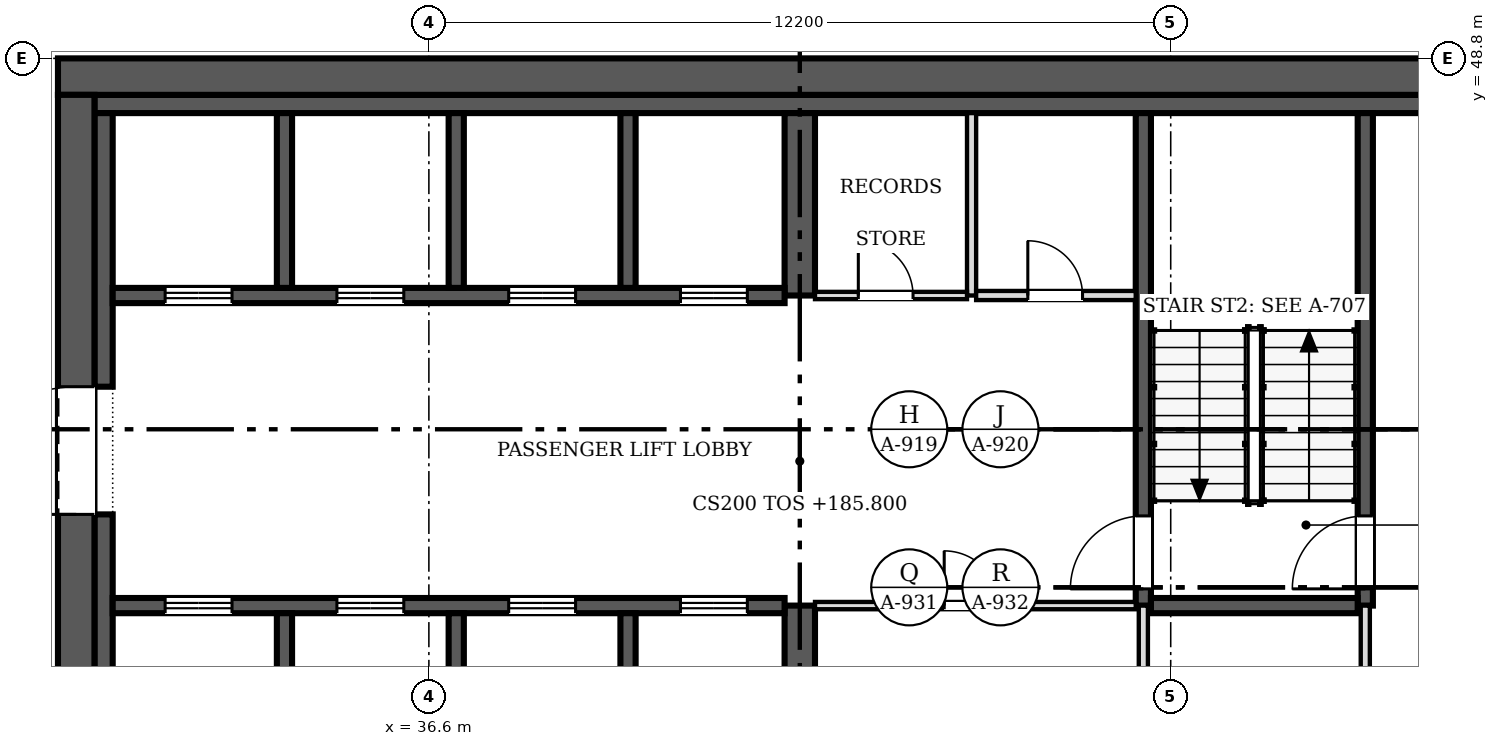
"""IFC4 building model, lengths in metres.
Left out: names, types, materials, properties, quantities, classifications, styles, units other than length and angle.
Written with IfcOpenShell. Run it as: python <this file> out.ifc"""

import sys

from ifc_helpers import new_model, si_unit, direction, frame, frame_2d, origin, place, context, subcontext, project, spatial, rectangle, extrude, source, transform, mapped, element, fill, save


model = new_model("IFC4")
c1 = context("Model", 3, precision=1e-05, world=origin(), true_north=direction((0.0, 1.0)))
c2 = subcontext(c1, "Body", "Model", "MODEL_VIEW")
j1 = project(units=[si_unit("LENGTHUNIT", "METRE"), si_unit("PLANEANGLEUNIT", "RADIAN")], contexts=[c1])
p1 = place(None, origin())
s1 = spatial("IfcSite", under=j1, at=p1, CompositionType="ELEMENT")
p2 = place(p1, origin())
s2 = spatial("IfcBuilding", under=s1, at=p2, CompositionType="ELEMENT")
p3 = place(p2, frame((0.0, 0.0, 185.8)))
s3 = spatial("IfcBuildingStorey", under=s2, at=p3, CompositionType="ELEMENT", Elevation=185.8)
p4 = place(p3, frame((30.8, 25.0, 0.0), z_axis=(0.0, 0.0, 1.0), x_axis=(0.0, 1.0, 0.0)))
e1 = element("IfcWall", 1, at=p4, inside=s3, PredefinedType="SHEAR", context=c2, shape_type="SweptSolid", body=[
    extrude(rectangle(XDim=23.2, YDim=0.6, at=frame_2d((11.6, 0.0))), origin(), (0.0, 0.0, 1.0), 3.8),
])
m1 = source(origin(), c2, "Body", "SweptSolid", [
    extrude(rectangle(XDim=2.1, YDim=2.4, at=frame_2d((1.05, 1.2))), frame((0.0, 0.31, 0.0), z_axis=(0.0, -1.0, 0.0), x_axis=(1.0, 0.0, 0.0)), (0.0, 0.0, 1.0), 0.62),
])
p5 = place(p4, frame((4.8, 0.0, 0.0)))
e2 = element("IfcOpeningElement", 2, at=p5, cuts=e1, PredefinedType="OPENING", context=c2, shape_type="MappedRepresentation", body=[
    mapped(m1, transform((0.0, 0.0, 0.0), scale=1.0)),
])
p6 = place(p4, frame((16.3, 0.0, 0.0)))
e3 = element("IfcOpeningElement", 3, at=p6, cuts=e1, PredefinedType="OPENING", context=c2, shape_type="MappedRepresentation", body=[
    mapped(m1, transform((0.0, 0.0, 0.0), scale=1.0)),
])
p7 = place(p3, frame((30.5, 48.5, 0.0), z_axis=(0.0, 0.0, 1.0), x_axis=(1.0, 0.0, 0.0)))
e4 = element("IfcWall", 4, at=p7, inside=s3, PredefinedType="SHEAR", context=c2, shape_type="SweptSolid", body=[
    extrude(rectangle(XDim=24.4, YDim=0.6, at=frame_2d((12.2, 0.0))), origin(), (0.0, 0.0, 1.0), 3.8),
])
p8 = place(p3, frame((31.1, 48.05, 0.0), z_axis=(0.0, 0.0, 1.0), x_axis=(1.0, 0.0, 0.0)))
e5 = element("IfcWall", 5, at=p8, inside=s3, PredefinedType="SOLIDWALL", context=c2, shape_type="SweptSolid", body=[
    extrude(rectangle(XDim=23.2, YDim=0.3, at=frame_2d((11.6, 0.0))), origin(), (0.0, 0.0, 1.0), 3.8),
])
p9 = place(p3, frame((31.25, 31.9, 0.0), z_axis=(0.0, 0.0, 1.0), x_axis=(0.0, 1.0, 0.0)))
e6 = element("IfcWall", 6, at=p9, inside=s3, PredefinedType="SOLIDWALL", context=c2, shape_type="SweptSolid", body=[
    extrude(rectangle(XDim=9.4, YDim=0.3, at=frame_2d((4.7, 0.0))), origin(), (0.0, 0.0, 1.0), 3.8),
])
p10 = place(p3, frame((31.25, 43.4, 0.0), z_axis=(0.0, 0.0, 1.0), x_axis=(0.0, 1.0, 0.0)))
e7 = element("IfcWall", 7, at=p10, inside=s3, PredefinedType="SOLIDWALL", context=c2, shape_type="SweptSolid", body=[
    extrude(rectangle(XDim=4.5, YDim=0.3, at=frame_2d((2.25, 0.0))), origin(), (0.0, 0.0, 1.0), 3.8),
])
p11 = place(p3, frame((42.7, 36.85, 0.0), z_axis=(0.0, 0.0, 1.0), x_axis=(0.0, 1.0, 0.0)))
e8 = element("IfcWall", 8, at=p11, inside=s3, PredefinedType="SHEAR", context=c2, shape_type="SweptSolid", body=[
    extrude(rectangle(XDim=2.95, YDim=0.5, at=frame_2d((1.475, 0.0))), origin(), (0.0, 0.0, 1.0), 3.8),
])
p12 = place(p3, frame((42.7, 44.9, 0.0), z_axis=(0.0, 0.0, 1.0), x_axis=(0.0, 1.0, 0.0)))
e9 = element("IfcWall", 9, at=p12, inside=s3, PredefinedType="SHEAR", context=c2, shape_type="SweptSolid", body=[
    extrude(rectangle(XDim=3.0, YDim=0.5, at=frame_2d((1.5, 0.0))), origin(), (0.0, 0.0, 1.0), 3.8),
])
p13 = place(p3, frame((31.4, 39.8, 0.0), z_axis=(0.0, 0.0, 1.0), x_axis=(1.0, 0.0, 0.0)))
e10 = element("IfcWall", 10, at=p13, inside=s3, PredefinedType="SOLIDWALL", context=c2, shape_type="SweptSolid", body=[
    extrude(rectangle(XDim=11.05, YDim=0.25, at=frame_2d((5.525, 0.0))), origin(), (0.0, 0.0, 1.0), 3.8),
])
m2 = source(origin(), c2, "Body", "SweptSolid", [
    extrude(rectangle(XDim=1.1, YDim=2.1, at=frame_2d((0.55, 1.05))), frame((0.0, 0.135, 0.0), z_axis=(0.0, -1.0, 0.0), x_axis=(1.0, 0.0, 0.0)), (0.0, 0.0, 1.0), 0.27),
])
p14 = place(p13, frame((0.863, 0.0, 0.0)))
e11 = element("IfcOpeningElement", 11, at=p14, cuts=e10, PredefinedType="OPENING", context=c2, shape_type="MappedRepresentation", body=[
    mapped(m2, transform((0.0, 0.0, 0.0), scale=1.0)),
])
p15 = place(p13, frame((3.688, 0.0, 0.0)))
e12 = element("IfcOpeningElement", 12, at=p15, cuts=e10, PredefinedType="OPENING", context=c2, shape_type="MappedRepresentation", body=[
    mapped(m2, transform((0.0, 0.0, 0.0), scale=1.0)),
])
p16 = place(p13, frame((6.512, 0.0, 0.0)))
e13 = element("IfcOpeningElement", 13, at=p16, cuts=e10, PredefinedType="OPENING", context=c2, shape_type="MappedRepresentation", body=[
    mapped(m2, transform((0.0, 0.0, 0.0), scale=1.0)),
])
p17 = place(p13, frame((9.337, 0.0, 0.0)))
e14 = element("IfcOpeningElement", 14, at=p17, cuts=e10, PredefinedType="OPENING", context=c2, shape_type="MappedRepresentation", body=[
    mapped(m2, transform((0.0, 0.0, 0.0), scale=1.0)),
])
p18 = place(p3, frame((42.45, 44.9, 0.0), z_axis=(0.0, 0.0, 1.0), x_axis=(-1.0, 0.0, 0.0)))
e15 = element("IfcWall", 15, at=p18, inside=s3, PredefinedType="SOLIDWALL", context=c2, shape_type="SweptSolid", body=[
    extrude(rectangle(XDim=11.05, YDim=0.25, at=frame_2d((5.525, 0.0))), origin(), (0.0, 0.0, 1.0), 3.8),
])
p19 = place(p18, frame((9.087, 0.0, 0.0)))
e16 = element("IfcOpeningElement", 16, at=p19, cuts=e15, PredefinedType="OPENING", context=c2, shape_type="MappedRepresentation", body=[
    mapped(m2, transform((0.0, 0.0, 0.0), scale=1.0)),
])
p20 = place(p18, frame((6.262, 0.0, 0.0)))
e17 = element("IfcOpeningElement", 17, at=p20, cuts=e15, PredefinedType="OPENING", context=c2, shape_type="MappedRepresentation", body=[
    mapped(m2, transform((0.0, 0.0, 0.0), scale=1.0)),
])
p21 = place(p18, frame((3.438, 0.0, 0.0)))
e18 = element("IfcOpeningElement", 18, at=p21, cuts=e15, PredefinedType="OPENING", context=c2, shape_type="MappedRepresentation", body=[
    mapped(m2, transform((0.0, 0.0, 0.0), scale=1.0)),
])
p22 = place(p18, frame((0.613, 0.0, 0.0)))
e19 = element("IfcOpeningElement", 19, at=p22, cuts=e15, PredefinedType="OPENING", context=c2, shape_type="MappedRepresentation", body=[
    mapped(m2, transform((0.0, 0.0, 0.0), scale=1.0)),
])
p23 = place(p3, frame((48.35, 47.9, 0.0), z_axis=(0.0, 0.0, 1.0), x_axis=(0.0, -1.0, 0.0)))
e20 = element("IfcWall", 20, at=p23, inside=s3, PredefinedType="SOLIDWALL", context=c2, shape_type="SweptSolid", body=[
    extrude(rectangle(XDim=8.1, YDim=0.25, at=frame_2d((4.05, 0.0))), origin(), (0.0, 0.0, 1.0), 3.8),
])
m3 = source(origin(), c2, "Body", "SweptSolid", [
    extrude(rectangle(XDim=1.2, YDim=2.1, at=frame_2d((0.6, 1.05))), frame((0.0, 0.135, 0.0), z_axis=(0.0, -1.0, 0.0), x_axis=(1.0, 0.0, 0.0)), (0.0, 0.0, 1.0), 0.27),
])
p24 = place(p23, frame((6.625, 0.0, 0.0)))
e21 = element("IfcOpeningElement", 21, at=p24, cuts=e20, PredefinedType="OPENING", context=c2, shape_type="MappedRepresentation", body=[
    mapped(m3, transform((0.0, 0.0, 0.0), scale=1.0)),
])
p25 = place(p3, frame((52.0, 39.8, 0.0), z_axis=(0.0, 0.0, 1.0), x_axis=(0.0, 1.0, 0.0)))
e22 = element("IfcWall", 22, at=p25, inside=s3, PredefinedType="SOLIDWALL", context=c2, shape_type="SweptSolid", body=[
    extrude(rectangle(XDim=8.1, YDim=0.25, at=frame_2d((4.05, 0.0))), origin(), (0.0, 0.0, 1.0), 3.8),
])
p26 = place(p25, frame((0.275, 0.0, 0.0)))
e23 = element("IfcOpeningElement", 23, at=p26, cuts=e22, PredefinedType="OPENING", context=c2, shape_type="MappedRepresentation", body=[
    mapped(m3, transform((0.0, 0.0, 0.0), scale=1.0)),
])
p27 = place(p3, frame((48.475, 39.8, 0.0), z_axis=(0.0, 0.0, 1.0), x_axis=(1.0, 0.0, 0.0)))
e24 = element("IfcWall", 24, at=p27, inside=s3, PredefinedType="SOLIDWALL", context=c2, shape_type="SweptSolid", body=[
    extrude(rectangle(XDim=3.4, YDim=0.25, at=frame_2d((1.7, 0.0))), origin(), (0.0, 0.0, 1.0), 3.8),
])
for number, where, z_axis, x_axis in (
    (25, (34.225, 36.85, 0.0), (0.0, 0.0, 1.0), (0.0, 1.0, 0.0)),
    (26, (37.05, 36.85, 0.0), (0.0, 0.0, 1.0), (0.0, 1.0, 0.0)),
    (27, (39.875, 36.85, 0.0), (0.0, 0.0, 1.0), (0.0, 1.0, 0.0)),
):
    element("IfcWall", number, at=place(p3, frame(where, z_axis=z_axis, x_axis=x_axis)), inside=s3, PredefinedType="SOLIDWALL", context=c2, shape_type="SweptSolid", body=[
        extrude(rectangle(XDim=2.825, YDim=0.25, at=frame_2d((1.413, 0.0))), origin(), (0.0, 0.0, 1.0), 3.8),
    ])
for number, where, z_axis, x_axis in (
    (28, (34.225, 45.025, 0.0), (0.0, 0.0, 1.0), (0.0, 1.0, 0.0)),
    (29, (37.05, 45.025, 0.0), (0.0, 0.0, 1.0), (0.0, 1.0, 0.0)),
    (30, (39.875, 45.025, 0.0), (0.0, 0.0, 1.0), (0.0, 1.0, 0.0)),
):
    element("IfcWall", number, at=place(p3, frame(where, z_axis=z_axis, x_axis=x_axis)), inside=s3, PredefinedType="SOLIDWALL", context=c2, shape_type="SweptSolid", body=[
        extrude(rectangle(XDim=2.875, YDim=0.25, at=frame_2d((1.438, 0.0))), origin(), (0.0, 0.0, 1.0), 3.8),
    ])
p28 = place(p3, frame((52.0, 33.525, 0.0), z_axis=(0.0, 0.0, 1.0), x_axis=(0.0, 1.0, 0.0)))
e31 = element("IfcWall", 31, at=p28, inside=s3, PredefinedType="PARTITIONING", context=c2, shape_type="SweptSolid", body=[
    extrude(rectangle(XDim=6.275, YDim=0.15, at=frame_2d((3.138, 0.0))), origin(), (0.0, 0.0, 1.0), 3.6),
])
m4 = source(origin(), c2, "Body", "SweptSolid", [
    extrude(rectangle(XDim=0.9, YDim=2.1, at=frame_2d((0.45, 1.05))), frame((0.0, 0.085, 0.0), z_axis=(0.0, -1.0, 0.0), x_axis=(1.0, 0.0, 0.0)), (0.0, 0.0, 1.0), 0.17),
])
p29 = place(p28, frame((1.025, 0.0, 0.0)))
e32 = element("IfcOpeningElement", 32, at=p29, cuts=e31, PredefinedType="OPENING", context=c2, shape_type="MappedRepresentation", body=[
    mapped(m4, transform((0.0, 0.0, 0.0), scale=1.0)),
])
p30 = place(p3, frame((48.225, 39.8, 0.0), z_axis=(0.0, 0.0, 1.0), x_axis=(-1.0, 0.0, 0.0)))
e33 = element("IfcWall", 33, at=p30, inside=s3, PredefinedType="PARTITIONING", context=c2, shape_type="SweptSolid", body=[
    extrude(rectangle(XDim=5.275, YDim=0.12, at=frame_2d((2.638, 0.0))), origin(), (0.0, 0.0, 1.0), 3.6),
])
m5 = source(origin(), c2, "Body", "SweptSolid", [
    extrude(rectangle(XDim=0.9, YDim=2.1, at=frame_2d((0.45, 1.05))), frame((0.0, 0.07, 0.0), z_axis=(0.0, -1.0, 0.0), x_axis=(1.0, 0.0, 0.0)), (0.0, 0.0, 1.0), 0.14),
])
p31 = place(p30, frame((2.25, 0.0, 0.0)))
e34 = element("IfcOpeningElement", 34, at=p31, cuts=e33, PredefinedType="OPENING", context=c2, shape_type="MappedRepresentation", body=[
    mapped(m5, transform((0.0, 0.0, 0.0), scale=1.0)),
])
p32 = place(p3, frame((48.35, 36.85, 0.0), z_axis=(0.0, 0.0, 1.0), x_axis=(0.0, 1.0, 0.0)))
e35 = element("IfcWall", 35, at=p32, inside=s3, PredefinedType="PARTITIONING", context=c2, shape_type="SweptSolid", body=[
    extrude(rectangle(XDim=2.95, YDim=0.15, at=frame_2d((1.475, 0.0))), origin(), (0.0, 0.0, 1.0), 3.6),
])
p33 = place(p3, frame((45.525, 44.9, 0.0), z_axis=(0.0, 0.0, 1.0), x_axis=(0.0, 1.0, 0.0)))
e36 = element("IfcWall", 36, at=p33, inside=s3, PredefinedType="PARTITIONING", context=c2, shape_type="SweptSolid", body=[
    extrude(rectangle(XDim=3.0, YDim=0.15, at=frame_2d((1.5, 0.0))), origin(), (0.0, 0.0, 1.0), 3.6),
])
p34 = place(p3, frame((42.95, 44.9, 0.0), z_axis=(0.0, 0.0, 1.0), x_axis=(1.0, 0.0, 0.0)))
e37 = element("IfcWall", 37, at=p34, inside=s3, PredefinedType="PARTITIONING", context=c2, shape_type="SweptSolid", body=[
    extrude(rectangle(XDim=2.5, YDim=0.12, at=frame_2d((1.25, 0.0))), origin(), (0.0, 0.0, 1.0), 3.6),
])
p35 = place(p34, frame((0.712, 0.0, 0.0)))
e38 = element("IfcOpeningElement", 38, at=p35, cuts=e37, PredefinedType="OPENING", context=c2, shape_type="MappedRepresentation", body=[
    mapped(m5, transform((0.0, 0.0, 0.0), scale=1.0)),
])
p36 = place(p3, frame((45.6, 44.9, 0.0), z_axis=(0.0, 0.0, 1.0), x_axis=(1.0, 0.0, 0.0)))
e39 = element("IfcWall", 39, at=p36, inside=s3, PredefinedType="PARTITIONING", context=c2, shape_type="SweptSolid", body=[
    extrude(rectangle(XDim=2.625, YDim=0.15, at=frame_2d((1.312, 0.0))), origin(), (0.0, 0.0, 1.0), 3.6),
])
p37 = place(p36, frame((0.85, 0.0, 0.0)))
e40 = element("IfcOpeningElement", 40, at=p37, cuts=e39, PredefinedType="OPENING", context=c2, shape_type="MappedRepresentation", body=[
    mapped(m4, transform((0.0, 0.0, 0.0), scale=1.0)),
])
m6 = source(origin(), c2, "Body", "SweptSolid", [
    extrude(rectangle(XDim=2.1, YDim=2.4, at=frame_2d((1.05, 1.2))), frame((0.0, 0.025, 0.0), z_axis=(0.0, -1.0, 0.0), x_axis=(1.0, 0.0, 0.0)), (0.0, 0.0, 1.0), 0.05),
])
p38 = place(p6, origin())
e41 = element("IfcDoor", 41, at=p38, inside=s3, OperationType="DOUBLE_DOOR_SINGLE_SWING", PredefinedType="DOOR", context=c2, shape_type="MappedRepresentation", body=[
    mapped(m6, transform((0.0, 0.0, 0.0), scale=1.0)),
])
fill(e3, e41)
m7 = source(origin(), c2, "Body", "SweptSolid", [
    extrude(rectangle(XDim=1.1, YDim=2.1, at=frame_2d((0.55, 1.05))), frame((0.0, 0.025, 0.0), z_axis=(0.0, -1.0, 0.0), x_axis=(1.0, 0.0, 0.0)), (0.0, 0.0, 1.0), 0.05),
])
p39 = place(p14, origin())
e42 = element("IfcDoor", 42, at=p39, inside=s3, OperationType="DOUBLE_DOOR_SLIDING", PredefinedType="DOOR", context=c2, shape_type="MappedRepresentation", body=[
    mapped(m7, transform((0.0, 0.0, 0.0), scale=1.0)),
])
fill(e11, e42)
p40 = place(p15, origin())
e43 = element("IfcDoor", 43, at=p40, inside=s3, OperationType="DOUBLE_DOOR_SLIDING", PredefinedType="DOOR", context=c2, shape_type="MappedRepresentation", body=[
    mapped(m7, transform((0.0, 0.0, 0.0), scale=1.0)),
])
fill(e12, e43)
p41 = place(p16, origin())
e44 = element("IfcDoor", 44, at=p41, inside=s3, OperationType="DOUBLE_DOOR_SLIDING", PredefinedType="DOOR", context=c2, shape_type="MappedRepresentation", body=[
    mapped(m7, transform((0.0, 0.0, 0.0), scale=1.0)),
])
fill(e13, e44)
p42 = place(p17, origin())
e45 = element("IfcDoor", 45, at=p42, inside=s3, OperationType="DOUBLE_DOOR_SLIDING", PredefinedType="DOOR", context=c2, shape_type="MappedRepresentation", body=[
    mapped(m7, transform((0.0, 0.0, 0.0), scale=1.0)),
])
fill(e14, e45)
p43 = place(p19, origin())
e46 = element("IfcDoor", 46, at=p43, inside=s3, OperationType="DOUBLE_DOOR_SLIDING", PredefinedType="DOOR", context=c2, shape_type="MappedRepresentation", body=[
    mapped(m7, transform((0.0, 0.0, 0.0), scale=1.0)),
])
fill(e16, e46)
p44 = place(p20, origin())
e47 = element("IfcDoor", 47, at=p44, inside=s3, OperationType="DOUBLE_DOOR_SLIDING", PredefinedType="DOOR", context=c2, shape_type="MappedRepresentation", body=[
    mapped(m7, transform((0.0, 0.0, 0.0), scale=1.0)),
])
fill(e17, e47)
p45 = place(p21, origin())
e48 = element("IfcDoor", 48, at=p45, inside=s3, OperationType="DOUBLE_DOOR_SLIDING", PredefinedType="DOOR", context=c2, shape_type="MappedRepresentation", body=[
    mapped(m7, transform((0.0, 0.0, 0.0), scale=1.0)),
])
fill(e18, e48)
p46 = place(p22, origin())
e49 = element("IfcDoor", 49, at=p46, inside=s3, OperationType="DOUBLE_DOOR_SLIDING", PredefinedType="DOOR", context=c2, shape_type="MappedRepresentation", body=[
    mapped(m7, transform((0.0, 0.0, 0.0), scale=1.0)),
])
fill(e19, e49)
m8 = source(origin(), c2, "Body", "SweptSolid", [
    extrude(rectangle(XDim=1.2, YDim=2.1, at=frame_2d((0.6, 1.05))), frame((0.0, 0.025, 0.0), z_axis=(0.0, -1.0, 0.0), x_axis=(1.0, 0.0, 0.0)), (0.0, 0.0, 1.0), 0.05),
])
p47 = place(p24, origin())
e50 = element("IfcDoor", 50, at=p47, inside=s3, OperationType="SINGLE_SWING_RIGHT", PredefinedType="DOOR", context=c2, shape_type="MappedRepresentation", body=[
    mapped(m8, transform((0.0, 0.0, 0.0), scale=1.0)),
])
fill(e21, e50)
p48 = place(p26, origin())
e51 = element("IfcDoor", 51, at=p48, inside=s3, OperationType="SINGLE_SWING_LEFT", PredefinedType="DOOR", context=c2, shape_type="MappedRepresentation", body=[
    mapped(m8, transform((0.0, 0.0, 0.0), scale=1.0)),
])
fill(e23, e51)
m9 = source(origin(), c2, "Body", "SweptSolid", [
    extrude(rectangle(XDim=0.9, YDim=2.1, at=frame_2d((0.45, 1.05))), frame((0.0, 0.025, 0.0), z_axis=(0.0, -1.0, 0.0), x_axis=(1.0, 0.0, 0.0)), (0.0, 0.0, 1.0), 0.05),
])
p49 = place(p31, origin())
e52 = element("IfcDoor", 52, at=p49, inside=s3, OperationType="SINGLE_SWING_RIGHT", PredefinedType="DOOR", context=c2, shape_type="MappedRepresentation", body=[
    mapped(m9, transform((0.0, 0.0, 0.0), scale=1.0)),
])
fill(e34, e52)
p50 = place(p35, origin())
e53 = element("IfcDoor", 53, at=p50, inside=s3, OperationType="SINGLE_SWING_LEFT", PredefinedType="DOOR", context=c2, shape_type="MappedRepresentation", body=[
    mapped(m9, transform((0.0, 0.0, 0.0), scale=1.0)),
])
fill(e38, e53)
p51 = place(p37, origin())
e54 = element("IfcDoor", 54, at=p51, inside=s3, OperationType="SINGLE_SWING_LEFT", PredefinedType="DOOR", context=c2, shape_type="MappedRepresentation", body=[
    mapped(m9, transform((0.0, 0.0, 0.0), scale=1.0)),
])
fill(e40, e54)
save(model, sys.argv[1])
